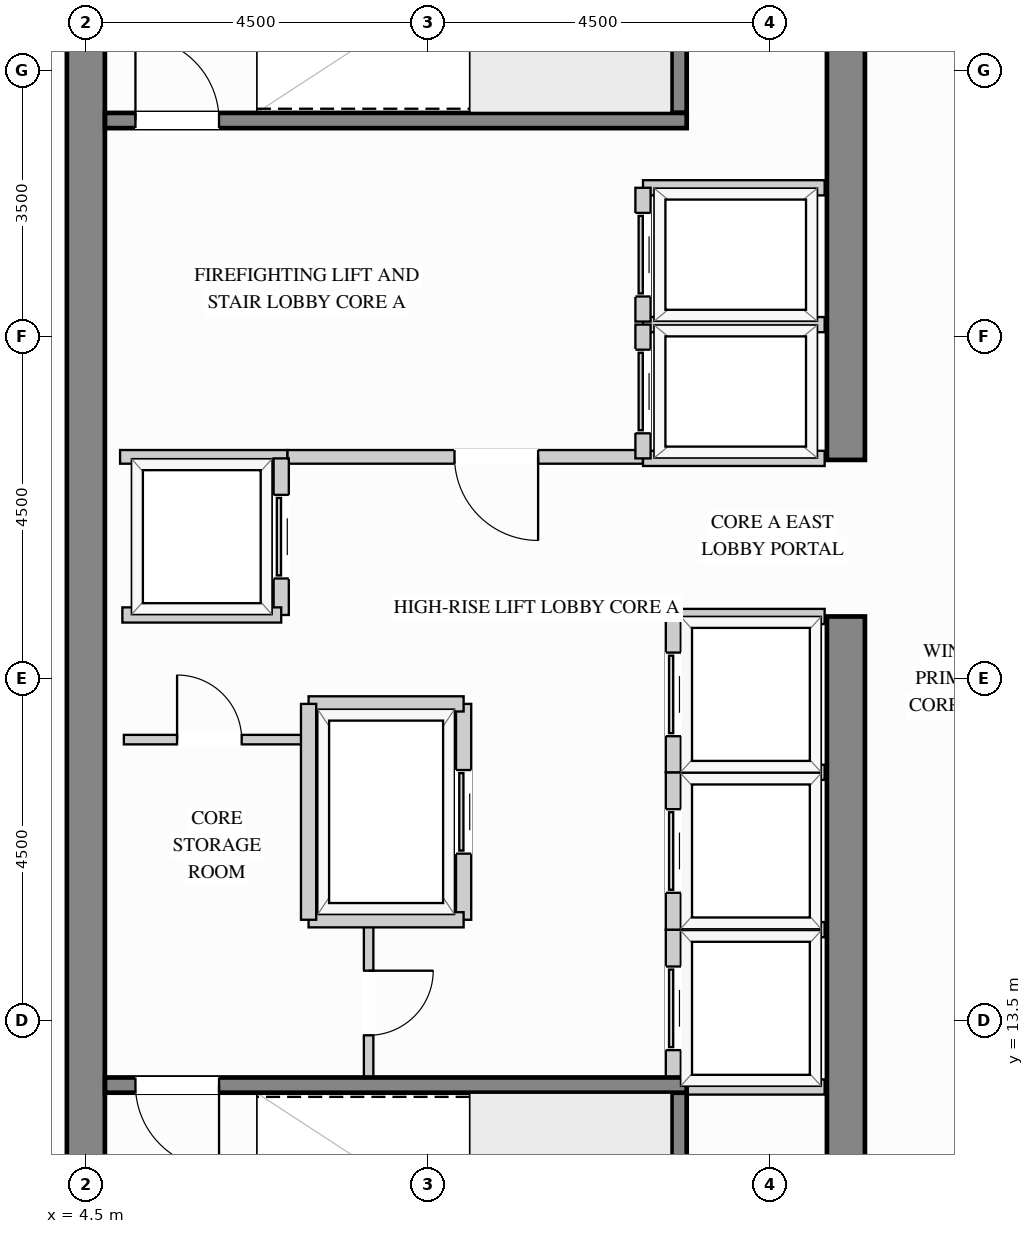
"""IFC4 building model, lengths in metres.
Left out: names, types, materials, properties, quantities, classifications, styles, units other than length and angle.
Written with IfcOpenShell. Run it as: python <this file> out.ifc"""

import sys

from ifc_helpers import new_model, si_unit, direction, frame, frame_2d, origin, place, context, subcontext, project, spatial, rectangle, extrude, source, transform, mapped, element, fill, save


model = new_model("IFC4")
c1 = context("Model", 3, precision=1e-05, world=origin(), true_north=direction((0.0, 1.0)))
c2 = subcontext(c1, "Body", "Model", "MODEL_VIEW")
j1 = project(units=[si_unit("LENGTHUNIT", "METRE"), si_unit("PLANEANGLEUNIT", "RADIAN")], contexts=[c1])
p1 = place(None, origin())
s1 = spatial("IfcSite", under=j1, at=p1, CompositionType="ELEMENT")
p2 = place(p1, origin())
s2 = spatial("IfcBuilding", under=s1, at=p2, CompositionType="ELEMENT")
p3 = place(p2, frame((0.0, 0.0, 259.2)))
s3 = spatial("IfcBuildingStorey", under=s2, at=p3, CompositionType="ELEMENT", Elevation=259.2)
m1 = source(origin(), c2, "Body", "SweptSolid", [
    extrude(rectangle(XDim=10.07, YDim=0.5, at=frame_2d((5.035, 0.0))), origin(), (0.0, 0.0, 1.0), 3.4),
])
p4 = place(p3, frame((14.5, 8.75, 0.0), z_axis=(0.0, 0.0, 1.0), x_axis=(0.0, 1.0, 0.0)))
e1 = element("IfcWall", 1, at=p4, inside=s3, PredefinedType="SHEAR", context=c2, shape_type="MappedRepresentation", body=[
    mapped(m1, transform((0.0, 0.0, 0.0), x_axis=(1.0, 0.0, 0.0), y_axis=(0.0, 1.0, 0.0), z_axis=(0.0, 0.0, 1.0))),
])
m2 = source(origin(), c2, "Body", "SweptSolid", [
    extrude(rectangle(XDim=8.37, YDim=0.5, at=frame_2d((4.185, 0.0))), origin(), (0.0, 0.0, 1.0), 3.4),
])
p5 = place(p3, frame((14.5, 20.88, 0.0), z_axis=(0.0, 0.0, 1.0), x_axis=(0.0, 1.0, 0.0)))
e2 = element("IfcWall", 2, at=p5, inside=s3, PredefinedType="SHEAR", context=c2, shape_type="MappedRepresentation", body=[
    mapped(m2, transform((0.0, 0.0, 0.0), x_axis=(1.0, 0.0, 0.0), y_axis=(0.0, 1.0, 0.0), z_axis=(0.0, 0.0, 1.0))),
])
m3 = source(origin(), c2, "Body", "SweptSolid", [
    extrude(rectangle(XDim=20.5, YDim=0.5, at=frame_2d((10.25, 0.0))), origin(), (0.0, 0.0, 1.0), 3.4),
])
p6 = place(p3, frame((4.5, 8.75, 0.0), z_axis=(0.0, 0.0, 1.0), x_axis=(0.0, 1.0, 0.0)))
e3 = element("IfcWall", 3, at=p6, inside=s3, PredefinedType="SHEAR", context=c2, shape_type="MappedRepresentation", body=[
    mapped(m3, transform((0.0, 0.0, 0.0), x_axis=(1.0, 0.0, 0.0), y_axis=(0.0, 1.0, 0.0), z_axis=(0.0, 0.0, 1.0))),
])
p7 = place(p3, frame((7.15, 20.92, 0.0), z_axis=(0.0, 0.0, 1.0), x_axis=(1.0, 0.0, 0.0)))
e4 = element("IfcWall", 4, at=p7, inside=s3, PredefinedType="PARTITIONING", context=c2, shape_type="SweptSolid", body=[
    extrude(rectangle(XDim=4.68, YDim=0.18, at=frame_2d((2.34, 0.0))), origin(), (0.0, 0.0, 1.0), 3.385),
])
p8 = place(p7, frame((2.2, 0.0, 0.0)))
e5 = element("IfcOpeningElement", 5, at=p8, cuts=e4, PredefinedType="OPENING", context=c2, shape_type="SweptSolid", body=[
    extrude(rectangle(XDim=1.1, YDim=2.15, at=frame_2d((0.55, 1.075))), frame((0.0, 0.1, 0.0), z_axis=(0.0, -1.0, 0.0), x_axis=(1.0, 0.0, 0.0)), (0.0, 0.0, 1.0), 0.2),
])
m4 = source(origin(), c2, "Body", "SweptSolid", [
    extrude(rectangle(XDim=2.2, YDim=0.18, at=frame_2d((1.1, 0.0))), origin(), (0.0, 0.0, 1.0), 3.385),
])
p9 = place(p3, frame((4.95, 20.92, 0.0), z_axis=(0.0, 0.0, 1.0), x_axis=(1.0, 0.0, 0.0)))
e6 = element("IfcWall", 6, at=p9, inside=s3, PredefinedType="PARTITIONING", context=c2, shape_type="MappedRepresentation", body=[
    mapped(m4, transform((0.0, 0.0, 0.0), x_axis=(1.0, 0.0, 0.0), y_axis=(0.0, 1.0, 0.0), z_axis=(0.0, 0.0, 1.0))),
])
p10 = place(p3, frame((8.22, 12.75, 0.0), z_axis=(0.0, 0.0, 1.0), x_axis=(0.0, 1.0, 0.0)))
e7 = element("IfcWall", 7, at=p10, inside=s3, PredefinedType="PARTITIONING", context=c2, shape_type="SweptSolid", body=[
    extrude(rectangle(XDim=2.07, YDim=0.125, at=frame_2d((1.035, 0.0))), origin(), (0.0, 0.0, 1.0), 3.385),
])
p11 = place(p10, frame((0.56, 0.0, 0.0)))
e8 = element("IfcOpeningElement", 8, at=p11, cuts=e7, PredefinedType="OPENING", context=c2, shape_type="SweptSolid", body=[
    extrude(rectangle(XDim=0.85, YDim=2.1, at=frame_2d((0.425, 1.05))), frame((0.0, 0.073, 0.0), z_axis=(0.0, -1.0, 0.0), x_axis=(1.0, 0.0, 0.0)), (0.0, 0.0, 1.0), 0.145),
])
p12 = place(p3, frame((5.0, 17.2, 0.0), z_axis=(0.0, 0.0, 1.0), x_axis=(1.0, 0.0, 0.0)))
e9 = element("IfcWall", 9, at=p12, inside=s3, PredefinedType="PARTITIONING", context=c2, shape_type="SweptSolid", body=[
    extrude(rectangle(XDim=2.4, YDim=0.125, at=frame_2d((1.2, 0.0))), origin(), (0.0, 0.0, 1.0), 3.385),
])
p13 = place(p12, frame((0.7, 0.0, 0.0)))
e10 = element("IfcOpeningElement", 10, at=p13, cuts=e9, PredefinedType="OPENING", context=c2, shape_type="SweptSolid", body=[
    extrude(rectangle(XDim=0.85, YDim=2.1, at=frame_2d((0.425, 1.05))), frame((0.0, 0.073, 0.0), z_axis=(0.0, -1.0, 0.0), x_axis=(1.0, 0.0, 0.0)), (0.0, 0.0, 1.0), 0.145),
])
m5 = source(origin(), c2, "Body", "SweptSolid", [
    extrude(rectangle(XDim=2.39, YDim=0.2, at=frame_2d((1.195, 0.0))), origin(), (0.0, 0.0, 1.0), 3.385),
])
for number, where, z_axis, x_axis in (
    (11, (11.83, 22.66, 0.0), (0.0, 0.0, 1.0), (1.0, 0.0, 0.0)),
    (12, (11.83, 20.9, 0.0), (0.0, 0.0, 1.0), (1.0, 0.0, 0.0)),
):
    element("IfcWall", number, at=place(p3, frame(where, z_axis=z_axis, x_axis=x_axis)), inside=s3, PredefinedType="PARTITIONING", context=c2, shape_type="MappedRepresentation", body=[
        mapped(m5, transform((0.0, 0.0, 0.0), x_axis=(1.0, 0.0, 0.0), y_axis=(0.0, 1.0, 0.0), z_axis=(0.0, 0.0, 1.0))),
    ])
p14 = place(p3, frame((11.83, 20.9, 0.0), z_axis=(0.0, 0.0, 1.0), x_axis=(0.0, 1.0, 0.0)))
e13 = element("IfcWall", 13, at=p14, inside=s3, PredefinedType="PARTITIONING", context=c2, shape_type="SweptSolid", body=[
    extrude(rectangle(XDim=1.76, YDim=0.2, at=frame_2d((0.88, 0.0))), origin(), (0.0, 0.0, 1.0), 3.385),
])
p15 = place(p14, frame((0.33, 0.0, 0.0)))
e14 = element("IfcOpeningElement", 14, at=p15, cuts=e13, PredefinedType="OPENING", context=c2, shape_type="SweptSolid", body=[
    extrude(rectangle(XDim=1.1, YDim=2.2, at=frame_2d((0.55, 1.1))), frame((0.0, 0.11, 0.0), z_axis=(0.0, -1.0, 0.0), x_axis=(1.0, 0.0, 0.0)), (0.0, 0.0, 1.0), 0.22),
])
p16 = place(p3, frame((11.83, 24.46, 0.0), z_axis=(0.0, 0.0, 1.0), x_axis=(1.0, 0.0, 0.0)))
e15 = element("IfcWall", 15, at=p16, inside=s3, PredefinedType="PARTITIONING", context=c2, shape_type="MappedRepresentation", body=[
    mapped(m5, transform((0.0, 0.0, 0.0), x_axis=(1.0, 0.0, 0.0), y_axis=(0.0, 1.0, 0.0), z_axis=(0.0, 0.0, 1.0))),
])
p17 = place(p3, frame((11.83, 22.7, 0.0), z_axis=(0.0, 0.0, 1.0), x_axis=(0.0, 1.0, 0.0)))
e16 = element("IfcWall", 16, at=p17, inside=s3, PredefinedType="PARTITIONING", context=c2, shape_type="SweptSolid", body=[
    extrude(rectangle(XDim=1.76, YDim=0.2, at=frame_2d((0.88, 0.0))), origin(), (0.0, 0.0, 1.0), 3.385),
])
p18 = place(p17, frame((0.33, 0.0, 0.0)))
e17 = element("IfcOpeningElement", 17, at=p18, cuts=e16, PredefinedType="OPENING", context=c2, shape_type="SweptSolid", body=[
    extrude(rectangle(XDim=1.1, YDim=2.2, at=frame_2d((0.55, 1.1))), frame((0.0, 0.11, 0.0), z_axis=(0.0, -1.0, 0.0), x_axis=(1.0, 0.0, 0.0)), (0.0, 0.0, 1.0), 0.22),
])
m6 = source(origin(), c2, "Body", "SweptSolid", [
    extrude(rectangle(XDim=1.99, YDim=0.2, at=frame_2d((0.995, 0.0))), origin(), (0.0, 0.0, 1.0), 3.385),
])
for number, where, z_axis, x_axis in (
    (18, (12.23, 14.7, 0.0), (0.0, 0.0, 1.0), (1.0, 0.0, 0.0)),
    (19, (12.23, 12.63, 0.0), (0.0, 0.0, 1.0), (1.0, 0.0, 0.0)),
):
    element("IfcWall", number, at=place(p3, frame(where, z_axis=z_axis, x_axis=x_axis)), inside=s3, PredefinedType="PARTITIONING", context=c2, shape_type="MappedRepresentation", body=[
        mapped(m6, transform((0.0, 0.0, 0.0), x_axis=(1.0, 0.0, 0.0), y_axis=(0.0, 1.0, 0.0), z_axis=(0.0, 0.0, 1.0))),
    ])
p19 = place(p3, frame((12.23, 12.63, 0.0), z_axis=(0.0, 0.0, 1.0), x_axis=(0.0, 1.0, 0.0)))
e20 = element("IfcWall", 20, at=p19, inside=s3, PredefinedType="PARTITIONING", context=c2, shape_type="SweptSolid", body=[
    extrude(rectangle(XDim=2.07, YDim=0.2, at=frame_2d((1.035, 0.0))), origin(), (0.0, 0.0, 1.0), 3.385),
])
p20 = place(p19, frame((0.485, 0.0, 0.0)))
e21 = element("IfcOpeningElement", 21, at=p20, cuts=e20, PredefinedType="OPENING", context=c2, shape_type="SweptSolid", body=[
    extrude(rectangle(XDim=1.1, YDim=2.2, at=frame_2d((0.55, 1.1))), frame((0.0, 0.11, 0.0), z_axis=(0.0, -1.0, 0.0), x_axis=(1.0, 0.0, 0.0)), (0.0, 0.0, 1.0), 0.22),
])
p21 = place(p3, frame((12.23, 16.77, 0.0), z_axis=(0.0, 0.0, 1.0), x_axis=(1.0, 0.0, 0.0)))
e22 = element("IfcWall", 22, at=p21, inside=s3, PredefinedType="PARTITIONING", context=c2, shape_type="MappedRepresentation", body=[
    mapped(m6, transform((0.0, 0.0, 0.0), x_axis=(1.0, 0.0, 0.0), y_axis=(0.0, 1.0, 0.0), z_axis=(0.0, 0.0, 1.0))),
])
p22 = place(p3, frame((12.23, 14.7, 0.0), z_axis=(0.0, 0.0, 1.0), x_axis=(0.0, 1.0, 0.0)))
e23 = element("IfcWall", 23, at=p22, inside=s3, PredefinedType="PARTITIONING", context=c2, shape_type="SweptSolid", body=[
    extrude(rectangle(XDim=2.07, YDim=0.2, at=frame_2d((1.035, 0.0))), origin(), (0.0, 0.0, 1.0), 3.385),
])
p23 = place(p22, frame((0.485, 0.0, 0.0)))
e24 = element("IfcOpeningElement", 24, at=p23, cuts=e23, PredefinedType="OPENING", context=c2, shape_type="SweptSolid", body=[
    extrude(rectangle(XDim=1.1, YDim=2.2, at=frame_2d((0.55, 1.1))), frame((0.0, 0.11, 0.0), z_axis=(0.0, -1.0, 0.0), x_axis=(1.0, 0.0, 0.0)), (0.0, 0.0, 1.0), 0.22),
])
p24 = place(p3, frame((12.23, 18.82, 0.0), z_axis=(0.0, 0.0, 1.0), x_axis=(1.0, 0.0, 0.0)))
e25 = element("IfcWall", 25, at=p24, inside=s3, PredefinedType="PARTITIONING", context=c2, shape_type="MappedRepresentation", body=[
    mapped(m6, transform((0.0, 0.0, 0.0), x_axis=(1.0, 0.0, 0.0), y_axis=(0.0, 1.0, 0.0), z_axis=(0.0, 0.0, 1.0))),
])
p25 = place(p3, frame((12.23, 16.77, 0.0), z_axis=(0.0, 0.0, 1.0), x_axis=(0.0, 1.0, 0.0)))
e26 = element("IfcWall", 26, at=p25, inside=s3, PredefinedType="PARTITIONING", context=c2, shape_type="SweptSolid", body=[
    extrude(rectangle(XDim=2.05, YDim=0.2, at=frame_2d((1.025, 0.0))), origin(), (0.0, 0.0, 1.0), 3.385),
])
p26 = place(p25, frame((0.475, 0.0, 0.0)))
e27 = element("IfcOpeningElement", 27, at=p26, cuts=e26, PredefinedType="OPENING", context=c2, shape_type="SweptSolid", body=[
    extrude(rectangle(XDim=1.1, YDim=2.2, at=frame_2d((0.55, 1.1))), frame((0.0, 0.11, 0.0), z_axis=(0.0, -1.0, 0.0), x_axis=(1.0, 0.0, 0.0)), (0.0, 0.0, 1.0), 0.22),
])
p27 = place(p3, frame((7.07, 18.84, 0.0), z_axis=(0.0, 0.0, 1.0), x_axis=(0.0, 1.0, 0.0)))
e28 = element("IfcWall", 28, at=p27, inside=s3, PredefinedType="PARTITIONING", context=c2, shape_type="SweptSolid", body=[
    extrude(rectangle(XDim=2.06, YDim=0.2, at=frame_2d((1.03, 0.0))), origin(), (0.0, 0.0, 1.0), 3.385),
])
p28 = place(p27, frame((0.48, 0.0, 0.0)))
e29 = element("IfcOpeningElement", 29, at=p28, cuts=e28, PredefinedType="OPENING", context=c2, shape_type="SweptSolid", body=[
    extrude(rectangle(XDim=1.1, YDim=2.2, at=frame_2d((0.55, 1.1))), frame((0.0, 0.11, 0.0), z_axis=(0.0, -1.0, 0.0), x_axis=(1.0, 0.0, 0.0)), (0.0, 0.0, 1.0), 0.22),
])
m7 = source(origin(), c2, "Body", "SweptSolid", [
    extrude(rectangle(XDim=2.09, YDim=0.2, at=frame_2d((1.045, 0.0))), origin(), (0.0, 0.0, 1.0), 3.385),
])
p29 = place(p3, frame((4.98, 18.84, 0.0), z_axis=(0.0, 0.0, 1.0), x_axis=(1.0, 0.0, 0.0)))
e30 = element("IfcWall", 30, at=p29, inside=s3, PredefinedType="PARTITIONING", context=c2, shape_type="MappedRepresentation", body=[
    mapped(m7, transform((0.0, 0.0, 0.0), x_axis=(1.0, 0.0, 0.0), y_axis=(0.0, 1.0, 0.0), z_axis=(0.0, 0.0, 1.0))),
])
p30 = place(p3, frame((9.47, 14.83, 0.0), z_axis=(0.0, 0.0, 1.0), x_axis=(0.0, 1.0, 0.0)))
e31 = element("IfcWall", 31, at=p30, inside=s3, PredefinedType="PARTITIONING", context=c2, shape_type="SweptSolid", body=[
    extrude(rectangle(XDim=2.84, YDim=0.2, at=frame_2d((1.42, 0.0))), origin(), (0.0, 0.0, 1.0), 3.385),
])
p31 = place(p30, frame((0.87, 0.0, 0.0)))
e32 = element("IfcOpeningElement", 32, at=p31, cuts=e31, PredefinedType="OPENING", context=c2, shape_type="SweptSolid", body=[
    extrude(rectangle(XDim=1.1, YDim=2.2, at=frame_2d((0.55, 1.1))), frame((0.0, 0.11, 0.0), z_axis=(0.0, -1.0, 0.0), x_axis=(1.0, 0.0, 0.0)), (0.0, 0.0, 1.0), 0.22),
])
m8 = source(origin(), c2, "Body", "SweptSolid", [
    extrude(rectangle(XDim=2.04, YDim=0.2, at=frame_2d((1.02, 0.0))), origin(), (0.0, 0.0, 1.0), 3.385),
])
for number, where, z_axis, x_axis in (
    (33, (7.43, 17.67, 0.0), (0.0, 0.0, 1.0), (1.0, 0.0, 0.0)),
    (34, (7.43, 14.83, 0.0), (0.0, 0.0, 1.0), (1.0, 0.0, 0.0)),
):
    element("IfcWall", number, at=place(p3, frame(where, z_axis=z_axis, x_axis=x_axis)), inside=s3, PredefinedType="PARTITIONING", context=c2, shape_type="MappedRepresentation", body=[
        mapped(m8, transform((0.0, 0.0, 0.0), x_axis=(1.0, 0.0, 0.0), y_axis=(0.0, 1.0, 0.0), z_axis=(0.0, 0.0, 1.0))),
    ])
m9 = source(origin(), c2, "Body", "SweptSolid", [
    extrude(rectangle(XDim=2.84, YDim=0.2, at=frame_2d((1.42, 0.0))), origin(), (0.0, 0.0, 1.0), 3.385),
])
p32 = place(p3, frame((7.43, 14.83, 0.0), z_axis=(0.0, 0.0, 1.0), x_axis=(0.0, 1.0, 0.0)))
e35 = element("IfcWall", 35, at=p32, inside=s3, PredefinedType="PARTITIONING", context=c2, shape_type="MappedRepresentation", body=[
    mapped(m9, transform((0.0, 0.0, 0.0), x_axis=(1.0, 0.0, 0.0), y_axis=(0.0, 1.0, 0.0), z_axis=(0.0, 0.0, 1.0))),
])
m10 = source(origin(), c2, "Body", "SweptSolid", [
    extrude(rectangle(XDim=3.803, YDim=0.2, at=frame_2d((1.901, 0.0))), origin(), (0.0, 0.0, 1.0), 3.4),
])
p33 = place(p3, frame((12.305, 8.752, 0.0), z_axis=(0.0, 0.0, 1.0), x_axis=(0.0, 1.0, 0.0)))
e36 = element("IfcWall", 36, at=p33, inside=s3, PredefinedType="SHEAR", context=c2, shape_type="MappedRepresentation", body=[
    mapped(m10, transform((0.0, 0.0, 0.0), x_axis=(1.0, 0.0, 0.0), y_axis=(0.0, 1.0, 0.0), z_axis=(0.0, 0.0, 1.0))),
])
p34 = place(p3, frame((4.752, 12.655, 0.0), z_axis=(0.0, 0.0, 1.0), x_axis=(1.0, 0.0, 0.0)))
e37 = element("IfcWall", 37, at=p34, inside=s3, PredefinedType="SHEAR", context=c2, shape_type="SweptSolid", body=[
    extrude(rectangle(XDim=7.653, YDim=0.2, at=frame_2d((3.827, 0.0))), origin(), (0.0, 0.0, 1.0), 3.4),
])
p35 = place(p34, frame((0.4, 0.0, 0.0)))
e38 = element("IfcOpeningElement", 38, at=p35, cuts=e37, PredefinedType="OPENING", context=c2, shape_type="SweptSolid", body=[
    extrude(rectangle(XDim=1.1, YDim=2.15, at=frame_2d((0.55, 1.075))), frame((0.0, 0.11, 0.0), z_axis=(0.0, -1.0, 0.0), x_axis=(1.0, 0.0, 0.0)), (0.0, 0.0, 1.0), 0.22),
])
p36 = place(p3, frame((12.305, 25.445, 0.0), z_axis=(0.0, 0.0, 1.0), x_axis=(0.0, 1.0, 0.0)))
e39 = element("IfcWall", 39, at=p36, inside=s3, PredefinedType="SHEAR", context=c2, shape_type="MappedRepresentation", body=[
    mapped(m10, transform((0.0, 0.0, 0.0), x_axis=(1.0, 0.0, 0.0), y_axis=(0.0, 1.0, 0.0), z_axis=(0.0, 0.0, 1.0))),
])
p37 = place(p3, frame((4.752, 25.345, 0.0), z_axis=(0.0, 0.0, 1.0), x_axis=(1.0, 0.0, 0.0)))
e40 = element("IfcWall", 40, at=p37, inside=s3, PredefinedType="SHEAR", context=c2, shape_type="SweptSolid", body=[
    extrude(rectangle(XDim=7.653, YDim=0.2, at=frame_2d((3.827, 0.0))), origin(), (0.0, 0.0, 1.0), 3.4),
])
p38 = place(p37, frame((0.4, 0.0, 0.0)))
e41 = element("IfcOpeningElement", 41, at=p38, cuts=e40, PredefinedType="OPENING", context=c2, shape_type="SweptSolid", body=[
    extrude(rectangle(XDim=1.1, YDim=2.15, at=frame_2d((0.55, 1.075))), frame((0.0, 0.11, 0.0), z_axis=(0.0, -1.0, 0.0), x_axis=(1.0, 0.0, 0.0)), (0.0, 0.0, 1.0), 0.22),
])
m11 = source(origin(), c2, "Body", "SweptSolid", [
    extrude(rectangle(XDim=1.1, YDim=2.15, at=frame_2d((0.55, 1.075))), frame((0.0, 0.025, 0.0), z_axis=(0.0, -1.0, 0.0), x_axis=(1.0, 0.0, 0.0)), (0.0, 0.0, 1.0), 0.05),
])
p39 = place(p8, origin())
e42 = element("IfcDoor", 42, at=p39, inside=s3, OperationType="SINGLE_SWING_RIGHT", PredefinedType="DOOR", context=c2, shape_type="MappedRepresentation", body=[
    mapped(m11, transform((0.0, 0.0, 0.0), x_axis=(1.0, 0.0, 0.0), y_axis=(0.0, 1.0, 0.0), z_axis=(0.0, 0.0, 1.0))),
])
fill(e5, e42)
m12 = source(origin(), c2, "Body", "SweptSolid", [
    extrude(rectangle(XDim=1.1, YDim=2.2, at=frame_2d((0.55, 1.1))), frame((0.0, 0.025, 0.0), z_axis=(0.0, -1.0, 0.0), x_axis=(1.0, 0.0, 0.0)), (0.0, 0.0, 1.0), 0.05),
])
p40 = place(p15, origin())
e43 = element("IfcDoor", 43, at=p40, inside=s3, OperationType="SLIDING_TO_LEFT", PredefinedType="DOOR", context=c2, shape_type="MappedRepresentation", body=[
    mapped(m12, transform((0.0, 0.0, 0.0), x_axis=(1.0, 0.0, 0.0), y_axis=(0.0, 1.0, 0.0), z_axis=(0.0, 0.0, 1.0))),
])
fill(e14, e43)
p41 = place(p18, origin())
e44 = element("IfcDoor", 44, at=p41, inside=s3, OperationType="SLIDING_TO_LEFT", PredefinedType="DOOR", context=c2, shape_type="MappedRepresentation", body=[
    mapped(m12, transform((0.0, 0.0, 0.0), x_axis=(1.0, 0.0, 0.0), y_axis=(0.0, 1.0, 0.0), z_axis=(0.0, 0.0, 1.0))),
])
fill(e17, e44)
p42 = place(p20, origin())
e45 = element("IfcDoor", 45, at=p42, inside=s3, OperationType="SLIDING_TO_LEFT", PredefinedType="DOOR", context=c2, shape_type="MappedRepresentation", body=[
    mapped(m12, transform((0.0, 0.0, 0.0), x_axis=(1.0, 0.0, 0.0), y_axis=(0.0, 1.0, 0.0), z_axis=(0.0, 0.0, 1.0))),
])
fill(e21, e45)
p43 = place(p23, origin())
e46 = element("IfcDoor", 46, at=p43, inside=s3, OperationType="SLIDING_TO_LEFT", PredefinedType="DOOR", context=c2, shape_type="MappedRepresentation", body=[
    mapped(m12, transform((0.0, 0.0, 0.0), x_axis=(1.0, 0.0, 0.0), y_axis=(0.0, 1.0, 0.0), z_axis=(0.0, 0.0, 1.0))),
])
fill(e24, e46)
p44 = place(p26, origin())
e47 = element("IfcDoor", 47, at=p44, inside=s3, OperationType="SLIDING_TO_LEFT", PredefinedType="DOOR", context=c2, shape_type="MappedRepresentation", body=[
    mapped(m12, transform((0.0, 0.0, 0.0), x_axis=(1.0, 0.0, 0.0), y_axis=(0.0, 1.0, 0.0), z_axis=(0.0, 0.0, 1.0))),
])
fill(e27, e47)
p45 = place(p28, origin())
e48 = element("IfcDoor", 48, at=p45, inside=s3, OperationType="SLIDING_TO_LEFT", PredefinedType="DOOR", context=c2, shape_type="MappedRepresentation", body=[
    mapped(m12, transform((0.0, 0.0, 0.0), x_axis=(1.0, 0.0, 0.0), y_axis=(0.0, 1.0, 0.0), z_axis=(0.0, 0.0, 1.0))),
])
fill(e29, e48)
p46 = place(p31, origin())
e49 = element("IfcDoor", 49, at=p46, inside=s3, OperationType="SLIDING_TO_LEFT", PredefinedType="DOOR", context=c2, shape_type="MappedRepresentation", body=[
    mapped(m12, transform((0.0, 0.0, 0.0), x_axis=(1.0, 0.0, 0.0), y_axis=(0.0, 1.0, 0.0), z_axis=(0.0, 0.0, 1.0))),
])
fill(e32, e49)
m13 = source(origin(), c2, "Body", "SweptSolid", [
    extrude(rectangle(XDim=0.85, YDim=2.1, at=frame_2d((0.425, 1.05))), frame((0.0, 0.025, 0.0), z_axis=(0.0, -1.0, 0.0), x_axis=(1.0, 0.0, 0.0)), (0.0, 0.0, 1.0), 0.05),
])
p47 = place(p13, origin())
e50 = element("IfcDoor", 50, at=p47, inside=s3, OperationType="SINGLE_SWING_LEFT", PredefinedType="DOOR", context=c2, shape_type="MappedRepresentation", body=[
    mapped(m13, transform((0.0, 0.0, 0.0), x_axis=(1.0, 0.0, 0.0), y_axis=(0.0, 1.0, 0.0), z_axis=(0.0, 0.0, 1.0))),
])
fill(e10, e50)
p48 = place(p11, origin())
e51 = element("IfcDoor", 51, at=p48, inside=s3, OperationType="SINGLE_SWING_RIGHT", PredefinedType="DOOR", context=c2, shape_type="MappedRepresentation", body=[
    mapped(m13, transform((0.0, 0.0, 0.0), x_axis=(1.0, 0.0, 0.0), y_axis=(0.0, 1.0, 0.0), z_axis=(0.0, 0.0, 1.0))),
])
fill(e8, e51)
m14 = source(origin(), c2, "Body", "SweptSolid", [
    extrude(rectangle(XDim=1.1, YDim=2.15, at=frame_2d((0.55, 1.075))), frame((0.0, 0.025, 0.0), z_axis=(0.0, -1.0, 0.0), x_axis=(1.0, 0.0, 0.0)), (0.0, 0.0, 1.0), 0.05),
])
p49 = place(p35, origin())
e52 = element("IfcDoor", 52, at=p49, inside=s3, OperationType="SINGLE_SWING_RIGHT", PredefinedType="DOOR", context=c2, shape_type="MappedRepresentation", body=[
    mapped(m14, transform((0.0, 0.0, 0.0), x_axis=(1.0, 0.0, 0.0), y_axis=(0.0, 1.0, 0.0), z_axis=(0.0, 0.0, 1.0))),
])
fill(e38, e52)
p50 = place(p38, origin())
e53 = element("IfcDoor", 53, at=p50, inside=s3, OperationType="SINGLE_SWING_LEFT", PredefinedType="DOOR", context=c2, shape_type="MappedRepresentation", body=[
    mapped(m14, transform((0.0, 0.0, 0.0), x_axis=(1.0, 0.0, 0.0), y_axis=(0.0, 1.0, 0.0), z_axis=(0.0, 0.0, 1.0))),
])
fill(e41, e53)
save(model, sys.argv[1])
